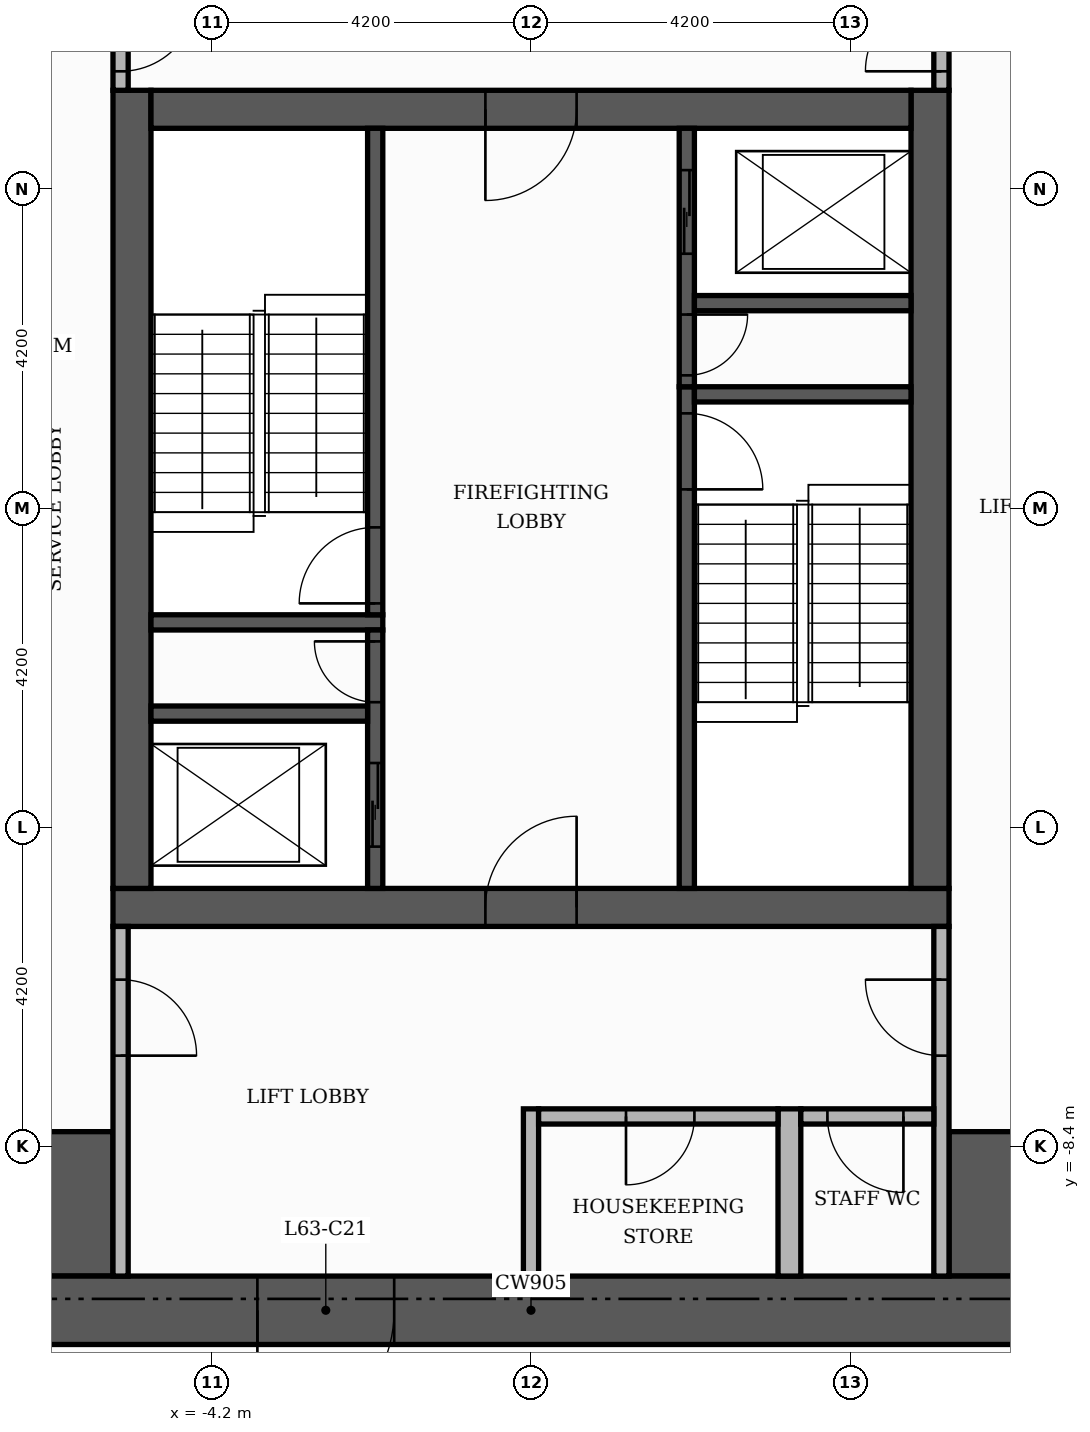
"""IFC4 building model, lengths in metres.
Left out: names, types, materials, properties, quantities, classifications, styles, units other than length and angle.
Written with IfcOpenShell. Run it as: python <this file> out.ifc"""

import sys

from ifc_helpers import new_model, si_unit, direction, frame, frame_2d, origin, place, context, subcontext, project, spatial, rectangle, extrude, element, fill, save


model = new_model("IFC4")
c1 = context("Model", 3, precision=1e-05, world=origin(), true_north=direction((0.0, 1.0)))
c2 = subcontext(c1, "Body", "Model", "MODEL_VIEW")
j1 = project(units=[si_unit("LENGTHUNIT", "METRE"), si_unit("PLANEANGLEUNIT", "RADIAN")], contexts=[c1])
p1 = place(None, origin())
s1 = spatial("IfcSite", under=j1, at=p1, CompositionType="ELEMENT")
p2 = place(p1, origin())
s2 = spatial("IfcBuilding", under=s1, at=p2, CompositionType="ELEMENT")
p3 = place(p2, frame((0.0, 0.0, 264.0)))
s3 = spatial("IfcBuildingStorey", under=s2, at=p3, CompositionType="ELEMENT", Elevation=264.0)
p4 = place(p3, frame((-5.5, -5.25, 0.0), z_axis=(0.0, 0.0, 1.0), x_axis=(1.0, 0.0, 0.0)))
e1 = element("IfcWall", 1, at=p4, inside=s3, PredefinedType="SHEAR", context=c2, shape_type="SweptSolid", body=[
    extrude(rectangle(XDim=11.0, YDim=0.5, at=frame_2d((5.5, 0.0))), origin(), (0.0, 0.0, 1.0), 3.48),
])
p5 = place(p4, frame((4.9, 0.0, 0.0)))
e2 = element("IfcOpeningElement", 2, at=p5, cuts=e1, PredefinedType="OPENING", context=c2, shape_type="SweptSolid", body=[
    extrude(rectangle(XDim=1.2, YDim=2.1, at=frame_2d((0.6, 1.05))), frame((0.0, 0.26, 0.0), z_axis=(0.0, -1.0, 0.0), x_axis=(1.0, 0.0, 0.0)), (0.0, 0.0, 1.0), 0.52),
])
for number, where, z_axis, x_axis in (
    (3, (-5.25, -5.0, 0.0), (0.0, 0.0, 1.0), (0.0, 1.0, 0.0)),
    (4, (5.25, -5.0, 0.0), (0.0, 0.0, 1.0), (0.0, 1.0, 0.0)),
):
    element("IfcWall", number, at=place(p3, frame(where, z_axis=z_axis, x_axis=x_axis)), inside=s3, PredefinedType="SHEAR", context=c2, shape_type="SweptSolid", body=[
        extrude(rectangle(XDim=10.5, YDim=0.5, at=frame_2d((5.25, 0.0))), origin(), (0.0, 0.0, 1.0), 3.48),
    ])
p6 = place(p3, frame((-5.0, 5.25, 0.0), z_axis=(0.0, 0.0, 1.0), x_axis=(1.0, 0.0, 0.0)))
e5 = element("IfcWall", 5, at=p6, inside=s3, PredefinedType="SHEAR", context=c2, shape_type="SweptSolid", body=[
    extrude(rectangle(XDim=10.0, YDim=0.5, at=frame_2d((5.0, 0.0))), origin(), (0.0, 0.0, 1.0), 3.48),
])
p7 = place(p6, frame((4.4, 0.0, 0.0)))
e6 = element("IfcOpeningElement", 6, at=p7, cuts=e5, PredefinedType="OPENING", context=c2, shape_type="SweptSolid", body=[
    extrude(rectangle(XDim=1.2, YDim=2.1, at=frame_2d((0.6, 1.05))), frame((0.0, 0.26, 0.0), z_axis=(0.0, -1.0, 0.0), x_axis=(1.0, 0.0, 0.0)), (0.0, 0.0, 1.0), 0.52),
])
for number, where, z_axis, x_axis in (
    (7, (-10.1, -9.15, 0.0), (0.0, 0.0, 1.0), (1.0, 0.0, 0.0)),
    (8, (5.5, -9.15, 0.0), (0.0, 0.0, 1.0), (1.0, 0.0, 0.0)),
):
    element("IfcWall", number, at=place(p3, frame(where, z_axis=z_axis, x_axis=x_axis)), inside=s3, PredefinedType="SHEAR", context=c2, shape_type="SweptSolid", body=[
        extrude(rectangle(XDim=4.6, YDim=1.9, at=frame_2d((2.3, 0.0))), origin(), (0.0, 0.0, 1.0), 3.48),
    ])
p8 = place(p3, frame((2.05, -5.0, 0.0), z_axis=(0.0, 0.0, 1.0), x_axis=(0.0, 1.0, 0.0)))
e9 = element("IfcWall", 9, at=p8, inside=s3, PredefinedType="SHEAR", context=c2, shape_type="SweptSolid", body=[
    extrude(rectangle(XDim=6.6, YDim=0.2, at=frame_2d((3.3, 0.0))), origin(), (0.0, 0.0, 1.0), 3.48),
])
p9 = place(p8, frame((5.25, 0.0, 0.0)))
e10 = element("IfcOpeningElement", 10, at=p9, cuts=e9, PredefinedType="OPENING", context=c2, shape_type="SweptSolid", body=[
    extrude(rectangle(XDim=1.0, YDim=2.1, at=frame_2d((0.5, 1.05))), frame((0.0, 0.11, 0.0), z_axis=(0.0, -1.0, 0.0), x_axis=(1.0, 0.0, 0.0)), (0.0, 0.0, 1.0), 0.22),
])
p10 = place(p3, frame((-5.0, -1.5, 0.0), z_axis=(0.0, 0.0, 1.0), x_axis=(1.0, 0.0, 0.0)))
e11 = element("IfcWall", 11, at=p10, inside=s3, PredefinedType="SHEAR", context=c2, shape_type="SweptSolid", body=[
    extrude(rectangle(XDim=3.05, YDim=0.2, at=frame_2d((1.525, 0.0))), origin(), (0.0, 0.0, 1.0), 3.48),
])
p11 = place(p3, frame((-2.05, -1.4, 0.0), z_axis=(0.0, 0.0, 1.0), x_axis=(0.0, 1.0, 0.0)))
e12 = element("IfcWall", 12, at=p11, inside=s3, PredefinedType="SHEAR", context=c2, shape_type="SweptSolid", body=[
    extrude(rectangle(XDim=6.4, YDim=0.2, at=frame_2d((3.2, 0.0))), origin(), (0.0, 0.0, 1.0), 3.48),
])
p12 = place(p11, frame((0.15, 0.0, 0.0)))
e13 = element("IfcOpeningElement", 13, at=p12, cuts=e12, PredefinedType="OPENING", context=c2, shape_type="SweptSolid", body=[
    extrude(rectangle(XDim=1.0, YDim=2.1, at=frame_2d((0.5, 1.05))), frame((0.0, 0.11, 0.0), z_axis=(0.0, -1.0, 0.0), x_axis=(1.0, 0.0, 0.0)), (0.0, 0.0, 1.0), 0.22),
])
p13 = place(p3, frame((2.15, 1.5, 0.0), z_axis=(0.0, 0.0, 1.0), x_axis=(1.0, 0.0, 0.0)))
e14 = element("IfcWall", 14, at=p13, inside=s3, PredefinedType="SHEAR", context=c2, shape_type="SweptSolid", body=[
    extrude(rectangle(XDim=2.85, YDim=0.2, at=frame_2d((1.425, 0.0))), origin(), (0.0, 0.0, 1.0), 3.48),
])
p14 = place(p3, frame((-2.05, -5.0, 0.0), z_axis=(0.0, 0.0, 1.0), x_axis=(0.0, 1.0, 0.0)))
e15 = element("IfcWall", 15, at=p14, inside=s3, PredefinedType="SHEAR", context=c2, shape_type="SweptSolid", body=[
    extrude(rectangle(XDim=3.4, YDim=0.2, at=frame_2d((1.7, 0.0))), origin(), (0.0, 0.0, 1.0), 3.48),
])
p15 = place(p14, frame((0.55, 0.0, 0.0)))
e16 = element("IfcOpeningElement", 16, at=p15, cuts=e15, PredefinedType="OPENING", context=c2, shape_type="SweptSolid", body=[
    extrude(rectangle(XDim=1.1, YDim=2.1, at=frame_2d((0.55, 1.05))), frame((0.0, 0.11, 0.0), z_axis=(0.0, -1.0, 0.0), x_axis=(1.0, 0.0, 0.0)), (0.0, 0.0, 1.0), 0.22),
])
p16 = place(p14, frame((2.45, 0.0, 0.0)))
e17 = element("IfcOpeningElement", 17, at=p16, cuts=e15, PredefinedType="OPENING", context=c2, shape_type="SweptSolid", body=[
    extrude(rectangle(XDim=0.8, YDim=2.1, at=frame_2d((0.4, 1.05))), frame((0.0, 0.11, 0.0), z_axis=(0.0, -1.0, 0.0), x_axis=(1.0, 0.0, 0.0)), (0.0, 0.0, 1.0), 0.22),
])
p17 = place(p3, frame((-5.0, -2.7, 0.0), z_axis=(0.0, 0.0, 1.0), x_axis=(1.0, 0.0, 0.0)))
e18 = element("IfcWall", 18, at=p17, inside=s3, PredefinedType="SHEAR", context=c2, shape_type="SweptSolid", body=[
    extrude(rectangle(XDim=2.85, YDim=0.2, at=frame_2d((1.425, 0.0))), origin(), (0.0, 0.0, 1.0), 3.48),
])
p18 = place(p3, frame((2.05, 1.6, 0.0), z_axis=(0.0, 0.0, 1.0), x_axis=(0.0, 1.0, 0.0)))
e19 = element("IfcWall", 19, at=p18, inside=s3, PredefinedType="SHEAR", context=c2, shape_type="SweptSolid", body=[
    extrude(rectangle(XDim=3.4, YDim=0.2, at=frame_2d((1.7, 0.0))), origin(), (0.0, 0.0, 1.0), 3.48),
])
p19 = place(p18, frame((1.75, 0.0, 0.0)))
e20 = element("IfcOpeningElement", 20, at=p19, cuts=e19, PredefinedType="OPENING", context=c2, shape_type="SweptSolid", body=[
    extrude(rectangle(XDim=1.1, YDim=2.1, at=frame_2d((0.55, 1.05))), frame((0.0, 0.11, 0.0), z_axis=(0.0, -1.0, 0.0), x_axis=(1.0, 0.0, 0.0)), (0.0, 0.0, 1.0), 0.22),
])
p20 = place(p18, frame((0.15, 0.0, 0.0)))
e21 = element("IfcOpeningElement", 21, at=p20, cuts=e19, PredefinedType="OPENING", context=c2, shape_type="SweptSolid", body=[
    extrude(rectangle(XDim=0.8, YDim=2.1, at=frame_2d((0.4, 1.05))), frame((0.0, 0.11, 0.0), z_axis=(0.0, -1.0, 0.0), x_axis=(1.0, 0.0, 0.0)), (0.0, 0.0, 1.0), 0.22),
])
p21 = place(p3, frame((2.15, 2.7, 0.0), z_axis=(0.0, 0.0, 1.0), x_axis=(1.0, 0.0, 0.0)))
e22 = element("IfcWall", 22, at=p21, inside=s3, PredefinedType="SHEAR", context=c2, shape_type="SweptSolid", body=[
    extrude(rectangle(XDim=2.85, YDim=0.2, at=frame_2d((1.425, 0.0))), origin(), (0.0, 0.0, 1.0), 3.48),
])
p22 = place(p3, frame((-11.0, -10.55, 0.0), z_axis=(0.0, 0.0, 1.0), x_axis=(1.0, 0.0, 0.0)))
e23 = element("IfcWall", 23, at=p22, inside=s3, PredefinedType="SHEAR", context=c2, shape_type="SweptSolid", body=[
    extrude(rectangle(XDim=22.0, YDim=0.9, at=frame_2d((11.0, 0.0))), origin(), (0.0, 0.0, 1.0), 3.48),
])
p23 = place(p22, frame((7.4, 0.0, 0.0)))
e24 = element("IfcOpeningElement", 24, at=p23, cuts=e23, PredefinedType="OPENING", context=c2, shape_type="SweptSolid", body=[
    extrude(rectangle(XDim=1.8, YDim=2.2, at=frame_2d((0.9, 1.1))), frame((0.0, 0.46, 0.0), z_axis=(0.0, -1.0, 0.0), x_axis=(1.0, 0.0, 0.0)), (0.0, 0.0, 1.0), 0.92),
])
p24 = place(p3, frame((-5.4, -10.1, 0.0), z_axis=(0.0, 0.0, 1.0), x_axis=(0.0, 1.0, 0.0)))
e25 = element("IfcWall", 25, at=p24, inside=s3, PredefinedType="PARTITIONING", context=c2, shape_type="SweptSolid", body=[
    extrude(rectangle(XDim=4.6, YDim=0.2, at=frame_2d((2.3, 0.0))), origin(), (0.0, 0.0, 1.0), 3.48),
])
p25 = place(p24, frame((2.9, 0.0, 0.0)))
e26 = element("IfcOpeningElement", 26, at=p25, cuts=e25, PredefinedType="OPENING", context=c2, shape_type="SweptSolid", body=[
    extrude(rectangle(XDim=1.0, YDim=2.1, at=frame_2d((0.5, 1.05))), frame((0.0, 0.11, 0.0), z_axis=(0.0, -1.0, 0.0), x_axis=(1.0, 0.0, 0.0)), (0.0, 0.0, 1.0), 0.22),
])
p26 = place(p3, frame((0.0, -10.1, 0.0), z_axis=(0.0, 0.0, 1.0), x_axis=(0.0, 1.0, 0.0)))
e27 = element("IfcWall", 27, at=p26, inside=s3, PredefinedType="PARTITIONING", context=c2, shape_type="SweptSolid", body=[
    extrude(rectangle(XDim=2.2, YDim=0.2, at=frame_2d((1.1, 0.0))), origin(), (0.0, 0.0, 1.0), 3.48),
])
p27 = place(p3, frame((3.4, -10.1, 0.0), z_axis=(0.0, 0.0, 1.0), x_axis=(0.0, 1.0, 0.0)))
e28 = element("IfcWall", 28, at=p27, inside=s3, PredefinedType="PARTITIONING", context=c2, shape_type="SweptSolid", body=[
    extrude(rectangle(XDim=2.2, YDim=0.3, at=frame_2d((1.1, 0.0))), origin(), (0.0, 0.0, 1.0), 3.48),
])
p28 = place(p3, frame((5.4, -10.1, 0.0), z_axis=(0.0, 0.0, 1.0), x_axis=(0.0, 1.0, 0.0)))
e29 = element("IfcWall", 29, at=p28, inside=s3, PredefinedType="PARTITIONING", context=c2, shape_type="SweptSolid", body=[
    extrude(rectangle(XDim=4.6, YDim=0.2, at=frame_2d((2.3, 0.0))), origin(), (0.0, 0.0, 1.0), 3.48),
])
p29 = place(p28, frame((2.9, 0.0, 0.0)))
e30 = element("IfcOpeningElement", 30, at=p29, cuts=e29, PredefinedType="OPENING", context=c2, shape_type="SweptSolid", body=[
    extrude(rectangle(XDim=1.0, YDim=2.1, at=frame_2d((0.5, 1.05))), frame((0.0, 0.11, 0.0), z_axis=(0.0, -1.0, 0.0), x_axis=(1.0, 0.0, 0.0)), (0.0, 0.0, 1.0), 0.22),
])
p30 = place(p3, frame((0.1, -8.0, 0.0), z_axis=(0.0, 0.0, 1.0), x_axis=(1.0, 0.0, 0.0)))
e31 = element("IfcWall", 31, at=p30, inside=s3, PredefinedType="PARTITIONING", context=c2, shape_type="SweptSolid", body=[
    extrude(rectangle(XDim=3.15, YDim=0.2, at=frame_2d((1.575, 0.0))), origin(), (0.0, 0.0, 1.0), 3.48),
])
p31 = place(p30, frame((1.15, 0.0, 0.0)))
e32 = element("IfcOpeningElement", 32, at=p31, cuts=e31, PredefinedType="OPENING", context=c2, shape_type="SweptSolid", body=[
    extrude(rectangle(XDim=0.9, YDim=2.1, at=frame_2d((0.45, 1.05))), frame((0.0, 0.11, 0.0), z_axis=(0.0, -1.0, 0.0), x_axis=(1.0, 0.0, 0.0)), (0.0, 0.0, 1.0), 0.22),
])
p32 = place(p3, frame((3.55, -8.0, 0.0), z_axis=(0.0, 0.0, 1.0), x_axis=(1.0, 0.0, 0.0)))
e33 = element("IfcWall", 33, at=p32, inside=s3, PredefinedType="PARTITIONING", context=c2, shape_type="SweptSolid", body=[
    extrude(rectangle(XDim=1.75, YDim=0.2, at=frame_2d((0.875, 0.0))), origin(), (0.0, 0.0, 1.0), 3.48),
])
p33 = place(p32, frame((0.35, 0.0, 0.0)))
e34 = element("IfcOpeningElement", 34, at=p33, cuts=e33, PredefinedType="OPENING", context=c2, shape_type="SweptSolid", body=[
    extrude(rectangle(XDim=1.0, YDim=2.1, at=frame_2d((0.5, 1.05))), frame((0.0, 0.11, 0.0), z_axis=(0.0, -1.0, 0.0), x_axis=(1.0, 0.0, 0.0)), (0.0, 0.0, 1.0), 0.22),
])
p34 = place(p3, frame((-5.4, 5.5, 0.0), z_axis=(0.0, 0.0, 1.0), x_axis=(0.0, 1.0, 0.0)))
e35 = element("IfcWall", 35, at=p34, inside=s3, PredefinedType="PARTITIONING", context=c2, shape_type="SweptSolid", body=[
    extrude(rectangle(XDim=1.55, YDim=0.2, at=frame_2d((0.775, 0.0))), origin(), (0.0, 0.0, 1.0), 3.48),
])
p35 = place(p34, frame((0.25, 0.0, 0.0)))
e36 = element("IfcOpeningElement", 36, at=p35, cuts=e35, PredefinedType="OPENING", context=c2, shape_type="SweptSolid", body=[
    extrude(rectangle(XDim=1.0, YDim=2.1, at=frame_2d((0.5, 1.05))), frame((0.0, 0.11, 0.0), z_axis=(0.0, -1.0, 0.0), x_axis=(1.0, 0.0, 0.0)), (0.0, 0.0, 1.0), 0.22),
])
p36 = place(p3, frame((5.4, 5.5, 0.0), z_axis=(0.0, 0.0, 1.0), x_axis=(0.0, 1.0, 0.0)))
e37 = element("IfcWall", 37, at=p36, inside=s3, PredefinedType="PARTITIONING", context=c2, shape_type="SweptSolid", body=[
    extrude(rectangle(XDim=4.6, YDim=0.2, at=frame_2d((2.3, 0.0))), origin(), (0.0, 0.0, 1.0), 3.48),
])
p37 = place(p36, frame((0.25, 0.0, 0.0)))
e38 = element("IfcOpeningElement", 38, at=p37, cuts=e37, PredefinedType="OPENING", context=c2, shape_type="SweptSolid", body=[
    extrude(rectangle(XDim=1.0, YDim=2.1, at=frame_2d((0.5, 1.05))), frame((0.0, 0.11, 0.0), z_axis=(0.0, -1.0, 0.0), x_axis=(1.0, 0.0, 0.0)), (0.0, 0.0, 1.0), 0.22),
])
p38 = place(p19, origin())
e39 = element("IfcDoor", 39, at=p38, inside=s3, OperationType="SLIDING_TO_LEFT", PredefinedType="DOOR", context=c2, shape_type="SweptSolid", body=[
    extrude(rectangle(XDim=1.1, YDim=2.1, at=frame_2d((0.55, 1.05))), frame((0.0, 0.025, 0.0), z_axis=(0.0, -1.0, 0.0), x_axis=(1.0, 0.0, 0.0)), (0.0, 0.0, 1.0), 0.05),
])
fill(e20, e39)
p39 = place(p15, origin())
e40 = element("IfcDoor", 40, at=p39, inside=s3, OperationType="SLIDING_TO_LEFT", PredefinedType="DOOR", context=c2, shape_type="SweptSolid", body=[
    extrude(rectangle(XDim=1.1, YDim=2.1, at=frame_2d((0.55, 1.05))), frame((0.0, 0.025, 0.0), z_axis=(0.0, -1.0, 0.0), x_axis=(1.0, 0.0, 0.0)), (0.0, 0.0, 1.0), 0.05),
])
fill(e16, e40)
p40 = place(p12, origin())
e41 = element("IfcDoor", 41, at=p40, inside=s3, OperationType="SINGLE_SWING_LEFT", PredefinedType="DOOR", context=c2, shape_type="SweptSolid", body=[
    extrude(rectangle(XDim=1.0, YDim=2.1, at=frame_2d((0.5, 1.05))), frame((0.0, 0.025, 0.0), z_axis=(0.0, -1.0, 0.0), x_axis=(1.0, 0.0, 0.0)), (0.0, 0.0, 1.0), 0.05),
])
fill(e13, e41)
p41 = place(p9, frame((1.0, 0.0, 0.0), z_axis=(0.0, 0.0, 1.0), x_axis=(-1.0, 0.0, 0.0)))
e42 = element("IfcDoor", 42, at=p41, inside=s3, OperationType="SINGLE_SWING_LEFT", PredefinedType="DOOR", context=c2, shape_type="SweptSolid", body=[
    extrude(rectangle(XDim=1.0, YDim=2.1, at=frame_2d((0.5, 1.05))), frame((0.0, 0.025, 0.0), z_axis=(0.0, -1.0, 0.0), x_axis=(1.0, 0.0, 0.0)), (0.0, 0.0, 1.0), 0.05),
])
fill(e10, e42)
p42 = place(p20, frame((0.8, 0.0, 0.0), z_axis=(0.0, 0.0, 1.0), x_axis=(-1.0, 0.0, 0.0)))
e43 = element("IfcDoor", 43, at=p42, inside=s3, OperationType="SINGLE_SWING_RIGHT", PredefinedType="DOOR", context=c2, shape_type="SweptSolid", body=[
    extrude(rectangle(XDim=0.8, YDim=2.1, at=frame_2d((0.4, 1.05))), frame((0.0, 0.025, 0.0), z_axis=(0.0, -1.0, 0.0), x_axis=(1.0, 0.0, 0.0)), (0.0, 0.0, 1.0), 0.05),
])
fill(e21, e43)
p43 = place(p16, origin())
e44 = element("IfcDoor", 44, at=p43, inside=s3, OperationType="SINGLE_SWING_RIGHT", PredefinedType="DOOR", context=c2, shape_type="SweptSolid", body=[
    extrude(rectangle(XDim=0.8, YDim=2.1, at=frame_2d((0.4, 1.05))), frame((0.0, 0.025, 0.0), z_axis=(0.0, -1.0, 0.0), x_axis=(1.0, 0.0, 0.0)), (0.0, 0.0, 1.0), 0.05),
])
fill(e17, e44)
p44 = place(p7, frame((1.2, 0.0, 0.0), z_axis=(0.0, 0.0, 1.0), x_axis=(-1.0, 0.0, 0.0)))
e45 = element("IfcDoor", 45, at=p44, inside=s3, OperationType="SINGLE_SWING_LEFT", PredefinedType="DOOR", context=c2, shape_type="SweptSolid", body=[
    extrude(rectangle(XDim=1.2, YDim=2.1, at=frame_2d((0.6, 1.05))), frame((0.0, 0.025, 0.0), z_axis=(0.0, -1.0, 0.0), x_axis=(1.0, 0.0, 0.0)), (0.0, 0.0, 1.0), 0.05),
])
fill(e6, e45)
p45 = place(p5, origin())
e46 = element("IfcDoor", 46, at=p45, inside=s3, OperationType="SINGLE_SWING_RIGHT", PredefinedType="DOOR", context=c2, shape_type="SweptSolid", body=[
    extrude(rectangle(XDim=1.2, YDim=2.1, at=frame_2d((0.6, 1.05))), frame((0.0, 0.025, 0.0), z_axis=(0.0, -1.0, 0.0), x_axis=(1.0, 0.0, 0.0)), (0.0, 0.0, 1.0), 0.05),
])
fill(e2, e46)
p46 = place(p35, frame((1.0, 0.0, 0.0), z_axis=(0.0, 0.0, 1.0), x_axis=(-1.0, 0.0, 0.0)))
e47 = element("IfcDoor", 47, at=p46, inside=s3, OperationType="SINGLE_SWING_RIGHT", PredefinedType="DOOR", context=c2, shape_type="SweptSolid", body=[
    extrude(rectangle(XDim=1.0, YDim=2.1, at=frame_2d((0.5, 1.05))), frame((0.0, 0.025, 0.0), z_axis=(0.0, -1.0, 0.0), x_axis=(1.0, 0.0, 0.0)), (0.0, 0.0, 1.0), 0.05),
])
fill(e36, e47)
p47 = place(p37, origin())
e48 = element("IfcDoor", 48, at=p47, inside=s3, OperationType="SINGLE_SWING_LEFT", PredefinedType="DOOR", context=c2, shape_type="SweptSolid", body=[
    extrude(rectangle(XDim=1.0, YDim=2.1, at=frame_2d((0.5, 1.05))), frame((0.0, 0.025, 0.0), z_axis=(0.0, -1.0, 0.0), x_axis=(1.0, 0.0, 0.0)), (0.0, 0.0, 1.0), 0.05),
])
fill(e38, e48)
p48 = place(p25, frame((1.0, 0.0, 0.0), z_axis=(0.0, 0.0, 1.0), x_axis=(-1.0, 0.0, 0.0)))
e49 = element("IfcDoor", 49, at=p48, inside=s3, OperationType="SINGLE_SWING_LEFT", PredefinedType="DOOR", context=c2, shape_type="SweptSolid", body=[
    extrude(rectangle(XDim=1.0, YDim=2.1, at=frame_2d((0.5, 1.05))), frame((0.0, 0.025, 0.0), z_axis=(0.0, -1.0, 0.0), x_axis=(1.0, 0.0, 0.0)), (0.0, 0.0, 1.0), 0.05),
])
fill(e26, e49)
p49 = place(p29, origin())
e50 = element("IfcDoor", 50, at=p49, inside=s3, OperationType="SINGLE_SWING_RIGHT", PredefinedType="DOOR", context=c2, shape_type="SweptSolid", body=[
    extrude(rectangle(XDim=1.0, YDim=2.1, at=frame_2d((0.5, 1.05))), frame((0.0, 0.025, 0.0), z_axis=(0.0, -1.0, 0.0), x_axis=(1.0, 0.0, 0.0)), (0.0, 0.0, 1.0), 0.05),
])
fill(e30, e50)
p50 = place(p23, frame((1.8, 0.0, 0.0), z_axis=(0.0, 0.0, 1.0), x_axis=(-1.0, 0.0, 0.0)))
e51 = element("IfcDoor", 51, at=p50, inside=s3, OperationType="DOUBLE_DOOR_SINGLE_SWING", PredefinedType="DOOR", context=c2, shape_type="SweptSolid", body=[
    extrude(rectangle(XDim=1.8, YDim=2.2, at=frame_2d((0.9, 1.1))), frame((0.0, 0.025, 0.0), z_axis=(0.0, -1.0, 0.0), x_axis=(1.0, 0.0, 0.0)), (0.0, 0.0, 1.0), 0.05),
])
fill(e24, e51)
p51 = place(p31, frame((0.9, 0.0, 0.0), z_axis=(0.0, 0.0, 1.0), x_axis=(-1.0, 0.0, 0.0)))
e52 = element("IfcDoor", 52, at=p51, inside=s3, OperationType="SINGLE_SWING_LEFT", PredefinedType="DOOR", context=c2, shape_type="SweptSolid", body=[
    extrude(rectangle(XDim=0.9, YDim=2.1, at=frame_2d((0.45, 1.05))), frame((0.0, 0.025, 0.0), z_axis=(0.0, -1.0, 0.0), x_axis=(1.0, 0.0, 0.0)), (0.0, 0.0, 1.0), 0.05),
])
fill(e32, e52)
p52 = place(p33, frame((1.0, 0.0, 0.0), z_axis=(0.0, 0.0, 1.0), x_axis=(-1.0, 0.0, 0.0)))
e53 = element("IfcDoor", 53, at=p52, inside=s3, OperationType="SINGLE_SWING_RIGHT", PredefinedType="DOOR", context=c2, shape_type="SweptSolid", body=[
    extrude(rectangle(XDim=1.0, YDim=2.1, at=frame_2d((0.5, 1.05))), frame((0.0, 0.025, 0.0), z_axis=(0.0, -1.0, 0.0), x_axis=(1.0, 0.0, 0.0)), (0.0, 0.0, 1.0), 0.05),
])
fill(e34, e53)
save(model, sys.argv[1])
